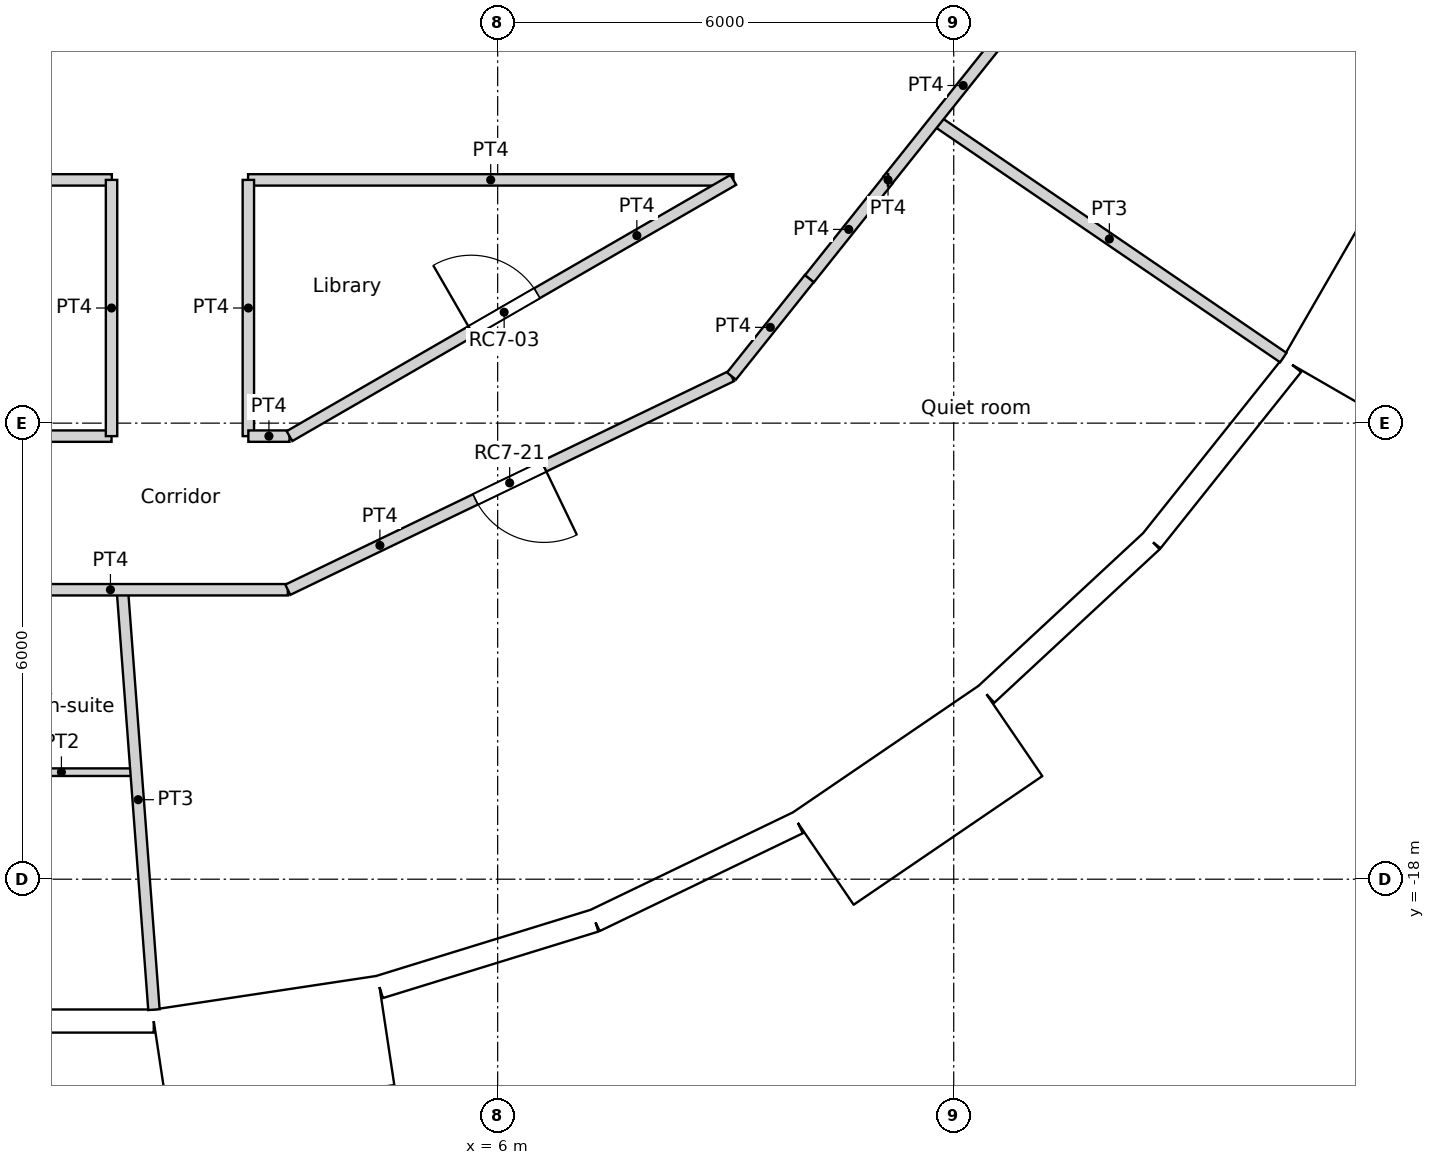
"""IFC4 building model, lengths in metres.
Left out: names, types, materials, properties, quantities, classifications, styles, units other than length and angle.
Written with IfcOpenShell. Run it as: python <this file> out.ifc"""

import sys

from ifc_helpers import new_model, si_unit, direction, frame, frame_2d, origin, origin_2d, place, context, subcontext, project, spatial, rectangle, circle, extrude, element, fill, save


model = new_model("IFC4")
c1 = context("Model", 3, precision=1e-05, world=origin(), true_north=direction((0.0, 1.0)))
c2 = subcontext(c1, "Body", "Model", "MODEL_VIEW")
j1 = project(units=[si_unit("LENGTHUNIT", "METRE"), si_unit("PLANEANGLEUNIT", "RADIAN")], contexts=[c1])
p1 = place(None, origin())
s1 = spatial("IfcSite", under=j1, at=p1, CompositionType="ELEMENT")
p2 = place(p1, origin())
s2 = spatial("IfcBuilding", under=s1, at=p2, CompositionType="ELEMENT")
p3 = place(p2, frame((0.0, 0.0, 294.6)))
s3 = spatial("IfcBuildingStorey", under=s2, at=p3, CompositionType="ELEMENT", Elevation=294.6)
for number, where, z_axis, x_axis in (
    (1, (1.406, -18.77, 0.0), (0.0, 0.0, 1.0), (1.0, 0.0, 0.0)),
    (2, (6.876, -17.521, 0.0), (0.0, 0.0, 1.0), (1.0, 0.0, 0.0)),
    (3, (11.735, -14.716, 0.0), (0.0, 0.0, 1.0), (1.0, 0.0, 0.0)),
    (4, (15.552, -10.603, 0.0), (0.0, 0.0, 1.0), (1.0, 0.0, 0.0)),
):
    element("IfcColumn", number, at=place(p3, frame(where, z_axis=z_axis, x_axis=x_axis)), inside=s3, PredefinedType="COLUMN", context=c2, shape_type="SweptSolid", body=[
        extrude(circle(Radius=0.45, at=origin_2d()), origin(), (0.0, 0.0, 1.0), 3.6),
    ])
p4 = place(p3, frame((-1.489, -19.866, 0.0), z_axis=(0.0, 0.0, 1.0), x_axis=(1.0, 0.0, 0.0)))
e5 = element("IfcWall", 5, at=p4, inside=s3, PredefinedType="SOLIDWALL", context=c2, shape_type="SweptSolid", body=[
    extrude(rectangle(XDim=2.962, YDim=0.3, at=frame_2d((1.481, 0.0))), origin(), (0.0, 0.0, 1.0), 3.25),
])
p5 = place(p4, frame((1.481, 0.0, 1.55)))
e6 = element("IfcOpeningElement", 6, at=p5, cuts=e5, PredefinedType="OPENING", context=c2, shape_type="SweptSolid", body=[
    extrude(circle(Radius=0.9, at=origin_2d()), frame((0.0, 0.16, 0.0), z_axis=(0.0, -1.0, 0.0), x_axis=(1.0, 0.0, 0.0)), (0.0, 0.0, 1.0), 0.32),
])
p6 = place(p3, frame((1.563, -20.436, -0.35), z_axis=(0.0, 0.0, 1.0), x_axis=(0.988836445254, 0.149004981587, 0.0)))
e7 = element("IfcWall", 7, at=p6, inside=s3, PredefinedType="ELEMENTEDWALL", context=c2, shape_type="SweptSolid", body=[
    extrude(rectangle(XDim=3.0, YDim=1.45, at=frame_2d((1.5, 0.0))), origin(), (0.0, 0.0, 1.0), 3.6),
])
p7 = place(p6, frame((1.5, 0.0, 1.9)))
e8 = element("IfcOpeningElement", 8, at=p7, cuts=e7, PredefinedType="OPENING", context=c2, shape_type="SweptSolid", body=[
    extrude(circle(Radius=0.9, at=origin_2d()), frame((0.0, 0.735, 0.0), z_axis=(0.0, -1.0, 0.0), x_axis=(1.0, 0.0, 0.0)), (0.0, 0.0, 1.0), 1.47),
])
p8 = place(p3, frame((4.448, -19.418, 0.0), z_axis=(0.0, 0.0, 1.0), x_axis=(0.95558635705, 0.294711238707, 0.0)))
e9 = element("IfcWall", 9, at=p8, inside=s3, PredefinedType="SOLIDWALL", context=c2, shape_type="SweptSolid", body=[
    extrude(rectangle(XDim=2.962, YDim=0.3, at=frame_2d((1.481, 0.0))), origin(), (0.0, 0.0, 1.0), 3.25),
])
p9 = place(p8, frame((1.481, 0.0, 1.55)))
e10 = element("IfcOpeningElement", 10, at=p9, cuts=e9, PredefinedType="OPENING", context=c2, shape_type="SweptSolid", body=[
    extrude(circle(Radius=0.9, at=origin_2d()), frame((0.0, 0.16, 0.0), z_axis=(0.0, -1.0, 0.0), x_axis=(1.0, 0.0, 0.0)), (0.0, 0.0, 1.0), 0.32),
])
p10 = place(p3, frame((7.278, -18.545, 0.0), z_axis=(0.0, 0.0, 1.0), x_axis=(0.900939615635, 0.433944476838, 0.0)))
e11 = element("IfcWall", 11, at=p10, inside=s3, PredefinedType="SOLIDWALL", context=c2, shape_type="SweptSolid", body=[
    extrude(rectangle(XDim=2.962, YDim=0.3, at=frame_2d((1.481, 0.0))), origin(), (0.0, 0.0, 1.0), 3.25),
])
p11 = place(p10, frame((1.481, 0.0, 1.55)))
e12 = element("IfcOpeningElement", 12, at=p11, cuts=e11, PredefinedType="OPENING", context=c2, shape_type="SweptSolid", body=[
    extrude(circle(Radius=0.9, at=origin_2d()), frame((0.0, 0.16, 0.0), z_axis=(0.0, -1.0, 0.0), x_axis=(1.0, 0.0, 0.0)), (0.0, 0.0, 1.0), 0.32),
])
p12 = place(p3, frame((10.275, -17.734, -0.35), z_axis=(0.0, 0.0, 1.0), x_axis=(0.826246281157, 0.563309047392, 0.0)))
e13 = element("IfcWall", 13, at=p12, inside=s3, PredefinedType="ELEMENTEDWALL", context=c2, shape_type="SweptSolid", body=[
    extrude(rectangle(XDim=3.0, YDim=1.45, at=frame_2d((1.5, 0.0))), origin(), (0.0, 0.0, 1.0), 3.6),
])
p13 = place(p12, frame((1.5, 0.0, 1.9)))
e14 = element("IfcOpeningElement", 14, at=p13, cuts=e13, PredefinedType="OPENING", context=c2, shape_type="SweptSolid", body=[
    extrude(circle(Radius=0.9, at=origin_2d()), frame((0.0, 0.735, 0.0), z_axis=(0.0, -1.0, 0.0), x_axis=(1.0, 0.0, 0.0)), (0.0, 0.0, 1.0), 1.47),
])
p14 = place(p3, frame((12.432, -15.565, 0.0), z_axis=(0.0, 0.0, 1.0), x_axis=(0.733066412643, 0.680157066165, 0.0)))
e15 = element("IfcWall", 15, at=p14, inside=s3, PredefinedType="SOLIDWALL", context=c2, shape_type="SweptSolid", body=[
    extrude(rectangle(XDim=2.962, YDim=0.3, at=frame_2d((1.481, 0.0))), origin(), (0.0, 0.0, 1.0), 3.25),
])
p15 = place(p14, frame((1.481, 0.0, 1.55)))
e16 = element("IfcOpeningElement", 16, at=p15, cuts=e15, PredefinedType="OPENING", context=c2, shape_type="SweptSolid", body=[
    extrude(circle(Radius=0.9, at=origin_2d()), frame((0.0, 0.16, 0.0), z_axis=(0.0, -1.0, 0.0), x_axis=(1.0, 0.0, 0.0)), (0.0, 0.0, 1.0), 0.32),
])
p16 = place(p3, frame((14.604, -13.55, 0.0), z_axis=(0.0, 0.0, 1.0), x_axis=(0.623498236992, 0.781824755599, 0.0)))
e17 = element("IfcWall", 17, at=p16, inside=s3, PredefinedType="SOLIDWALL", context=c2, shape_type="SweptSolid", body=[
    extrude(rectangle(XDim=2.962, YDim=0.3, at=frame_2d((1.481, 0.0))), origin(), (0.0, 0.0, 1.0), 3.25),
])
p17 = place(p16, frame((1.481, 0.0, 1.55)))
e18 = element("IfcOpeningElement", 18, at=p17, cuts=e17, PredefinedType="OPENING", context=c2, shape_type="SweptSolid", body=[
    extrude(circle(Radius=0.9, at=origin_2d()), frame((0.0, 0.16, 0.0), z_axis=(0.0, -1.0, 0.0), x_axis=(1.0, 0.0, 0.0)), (0.0, 0.0, 1.0), 0.32),
])
p18 = place(p3, frame((16.952, -11.52, -0.35), z_axis=(0.0, 0.0, 1.0), x_axis=(0.499990139034, 0.866031096941, 0.0)))
e19 = element("IfcWall", 19, at=p18, inside=s3, PredefinedType="ELEMENTEDWALL", context=c2, shape_type="SweptSolid", body=[
    extrude(rectangle(XDim=3.0, YDim=1.45, at=frame_2d((1.5, 0.0))), origin(), (0.0, 0.0, 1.0), 3.6),
])
p19 = place(p18, frame((1.5, 0.0, 1.9)))
e20 = element("IfcOpeningElement", 20, at=p19, cuts=e19, PredefinedType="OPENING", context=c2, shape_type="SweptSolid", body=[
    extrude(circle(Radius=0.9, at=origin_2d()), frame((0.0, 0.735, 0.0), z_axis=(0.0, -1.0, 0.0), x_axis=(1.0, 0.0, 0.0)), (0.0, 0.0, 1.0), 1.47),
])
p20 = place(p3, frame((-9.092, -8.8, 0.0), z_axis=(0.0, 0.0, 1.0), x_axis=(1.0, 0.0, 0.0)))
e21 = element("IfcWall", 21, at=p20, inside=s3, PredefinedType="PARTITIONING", context=c2, shape_type="SweptSolid", body=[
    extrude(rectangle(XDim=10.016, YDim=0.15, at=frame_2d((5.008, 0.0))), origin(), (0.0, 0.0, 1.0), 3.25),
])
p21 = place(p20, frame((4.508, 0.0, 0.0)))
e22 = element("IfcOpeningElement", 22, at=p21, cuts=e21, PredefinedType="OPENING", context=c2, shape_type="SweptSolid", body=[
    extrude(rectangle(XDim=1.0, YDim=2.04, at=frame_2d((0.5, 1.02))), frame((0.0, 0.075, 0.0), z_axis=(0.0, -1.0, 0.0), x_axis=(1.0, 0.0, 0.0)), (0.0, 0.0, 1.0), 0.15),
])
p22 = place(p3, frame((2.716, -8.8, 0.0), z_axis=(0.0, 0.0, 1.0), x_axis=(1.0, 0.0, 0.0)))
e23 = element("IfcWall", 23, at=p22, inside=s3, PredefinedType="PARTITIONING", context=c2, shape_type="SweptSolid", body=[
    extrude(rectangle(XDim=6.385, YDim=0.15, at=frame_2d((3.192, 0.0))), origin(), (0.0, 0.0, 1.0), 3.25),
])
p23 = place(p3, frame((11.137, -8.8, 0.0), z_axis=(0.0, 0.0, 1.0), x_axis=(-1.0, 0.0, 0.0)))
e24 = element("IfcWall", 24, at=p23, inside=s3, PredefinedType="PARTITIONING", context=c2, shape_type="SweptSolid", body=[
    extrude(rectangle(XDim=0.003, YDim=0.15, at=frame_2d((0.001, 0.0))), origin(), (0.0, 0.0, 1.0), 3.25),
])
p24 = place(p3, frame((10.101, -10.101, 0.0), z_axis=(0.0, 0.0, 1.0), x_axis=(0.623098344652, 0.782143498913, 0.0)))
e25 = element("IfcWall", 25, at=p24, inside=s3, PredefinedType="PARTITIONING", context=c2, shape_type="SweptSolid", body=[
    extrude(rectangle(XDim=1.661, YDim=0.15, at=frame_2d((0.831, 0.0))), origin(), (0.0, 0.0, 1.0), 3.25),
])
p25 = place(p3, frame((11.134, -8.8, 0.0), z_axis=(0.0, 0.0, 1.0), x_axis=(0.623560523309, 0.781775078761, 0.0)))
e26 = element("IfcWall", 26, at=p25, inside=s3, PredefinedType="PARTITIONING", context=c2, shape_type="SweptSolid", body=[
    extrude(rectangle(XDim=3.177, YDim=0.15, at=frame_2d((1.589, 0.0))), origin(), (0.0, 0.0, 1.0), 3.25),
])
p26 = place(p3, frame((-3.261, -12.171, 0.0), z_axis=(0.0, 0.0, 1.0), x_axis=(1.0, 0.0, 0.0)))
e27 = element("IfcWall", 27, at=p26, inside=s3, PredefinedType="PARTITIONING", context=c2, shape_type="SweptSolid", body=[
    extrude(rectangle(XDim=4.181, YDim=0.15, at=frame_2d((2.09, 0.0))), origin(), (0.0, 0.0, 1.0), 3.25),
])
for number, where, z_axis, x_axis in (
    (28, (0.92, -12.171, 0.0), (0.0, 0.0, 1.0), (0.0, 1.0, 0.0)),
    (29, (2.72, -12.171, 0.0), (0.0, 0.0, 1.0), (0.0, 1.0, 0.0)),
):
    element("IfcWall", number, at=place(p3, frame(where, z_axis=z_axis, x_axis=x_axis)), inside=s3, PredefinedType="PARTITIONING", context=c2, shape_type="SweptSolid", body=[
        extrude(rectangle(XDim=3.371, YDim=0.15, at=frame_2d((1.686, 0.0))), origin(), (0.0, 0.0, 1.0), 3.25),
    ])
p27 = place(p3, frame((2.72, -12.171, 0.0), z_axis=(0.0, 0.0, 1.0), x_axis=(1.0, 0.0, 0.0)))
e30 = element("IfcWall", 30, at=p27, inside=s3, PredefinedType="PARTITIONING", context=c2, shape_type="SweptSolid", body=[
    extrude(rectangle(XDim=0.541, YDim=0.15, at=frame_2d((0.271, 0.0))), origin(), (0.0, 0.0, 1.0), 3.25),
])
p28 = place(p3, frame((3.261, -12.171, 0.0), z_axis=(0.0, 0.0, 1.0), x_axis=(0.866066809554, 0.499928276245, 0.0)))
e31 = element("IfcWall", 31, at=p28, inside=s3, PredefinedType="PARTITIONING", context=c2, shape_type="SweptSolid", body=[
    extrude(rectangle(XDim=6.743, YDim=0.15, at=frame_2d((3.371, 0.0))), origin(), (0.0, 0.0, 1.0), 3.25),
])
p29 = place(p28, frame((2.761, 0.0, 0.0)))
e32 = element("IfcOpeningElement", 32, at=p29, cuts=e31, PredefinedType="OPENING", context=c2, shape_type="SweptSolid", body=[
    extrude(rectangle(XDim=1.0, YDim=2.04, at=frame_2d((0.5, 1.02))), frame((0.0, 0.075, 0.0), z_axis=(0.0, -1.0, 0.0), x_axis=(1.0, 0.0, 0.0)), (0.0, 0.0, 1.0), 0.15),
])
p30 = place(p3, frame((-3.239, -14.192, 0.0), z_axis=(0.0, 0.0, 1.0), x_axis=(1.0, 0.0, 0.0)))
e33 = element("IfcWall", 33, at=p30, inside=s3, PredefinedType="PARTITIONING", context=c2, shape_type="SweptSolid", body=[
    extrude(rectangle(XDim=6.478, YDim=0.15, at=frame_2d((3.239, 0.0))), origin(), (0.0, 0.0, 1.0), 3.25),
])
p31 = place(p30, frame((0.761, 0.0, 0.0)))
e34 = element("IfcOpeningElement", 34, at=p31, cuts=e33, PredefinedType="OPENING", context=c2, shape_type="SweptSolid", body=[
    extrude(rectangle(XDim=1.0, YDim=2.1, at=frame_2d((0.5, 1.05))), frame((0.0, 0.075, 0.0), z_axis=(0.0, -1.0, 0.0), x_axis=(1.0, 0.0, 0.0)), (0.0, 0.0, 1.0), 0.15),
])
p32 = place(p3, frame((9.076, -11.381, 0.0), z_axis=(0.0, 0.0, 1.0), x_axis=(0.623805208652, 0.781579849829, 0.0)))
e35 = element("IfcWall", 35, at=p32, inside=s3, PredefinedType="PARTITIONING", context=c2, shape_type="SweptSolid", body=[
    extrude(rectangle(XDim=1.64, YDim=0.15, at=frame_2d((0.82, 0.0))), origin(), (0.0, 0.0, 1.0), 3.25),
])
p33 = place(p3, frame((3.239, -14.192, 0.0), z_axis=(0.0, 0.0, 1.0), x_axis=(0.900976027191, 0.433868872388, 0.0)))
e36 = element("IfcWall", 36, at=p33, inside=s3, PredefinedType="PARTITIONING", context=c2, shape_type="SweptSolid", body=[
    extrude(rectangle(XDim=6.479, YDim=0.15, at=frame_2d((3.239, 0.0))), origin(), (0.0, 0.0, 1.0), 3.25),
])
p34 = place(p33, frame((2.74, 0.0, 0.0)))
e37 = element("IfcOpeningElement", 37, at=p34, cuts=e36, PredefinedType="OPENING", context=c2, shape_type="SweptSolid", body=[
    extrude(rectangle(XDim=1.0, YDim=2.04, at=frame_2d((0.5, 1.02))), frame((0.0, 0.075, 0.0), z_axis=(0.0, -1.0, 0.0), x_axis=(1.0, 0.0, 0.0)), (0.0, 0.0, 1.0), 0.15),
])
p35 = place(p3, frame((-0.722, -16.592, 0.0), z_axis=(0.0, 0.0, 1.0), x_axis=(1.0, 0.0, 0.0)))
e38 = element("IfcWall", 38, at=p35, inside=s3, PredefinedType="PARTITIONING", context=c2, shape_type="SweptSolid", body=[
    extrude(rectangle(XDim=1.965, YDim=0.1, at=frame_2d((0.982, 0.0))), origin(), (0.0, 0.0, 1.0), 3.25),
])
for number, where, z_axis, x_axis in (
    (39, (1.062, -14.192, 0.0), (0.0, 0.0, 1.0), (0.075, -0.997, 0.0)),
    (40, (11.759, -8.017, 0.0), (0.0, 0.0, 1.0), (0.826, -0.563, 0.0)),
):
    element("IfcWall", number, at=place(p3, frame(where, z_axis=z_axis, x_axis=x_axis)), inside=s3, PredefinedType="PARTITIONING", context=c2, shape_type="SweptSolid", body=[
        extrude(rectangle(XDim=5.54, YDim=0.15, at=frame_2d((2.77, 0.0))), origin(), (0.0, 0.0, 1.0), 3.25),
    ])
p36 = place(p5, origin())
e41 = element("IfcWindow", 41, at=p36, inside=s3, PartitioningType="SINGLE_PANEL", PredefinedType="WINDOW", context=c2, shape_type="SweptSolid", body=[
    extrude(circle(Radius=0.9, at=origin_2d()), frame((0.0, 0.12, 0.0), z_axis=(0.0, -1.0, 0.0), x_axis=(1.0, 0.0, 0.0)), (0.0, 0.0, 1.0), 0.1),
])
fill(e6, e41)
p37 = place(p7, origin())
e42 = element("IfcWindow", 42, at=p37, inside=s3, PartitioningType="SINGLE_PANEL", PredefinedType="WINDOW", context=c2, shape_type="SweptSolid", body=[
    extrude(circle(Radius=0.9, at=origin_2d()), frame((0.0, 0.695, 0.0), z_axis=(0.0, -1.0, 0.0), x_axis=(1.0, 0.0, 0.0)), (0.0, 0.0, 1.0), 0.1),
])
fill(e8, e42)
p38 = place(p9, origin())
e43 = element("IfcWindow", 43, at=p38, inside=s3, PartitioningType="SINGLE_PANEL", PredefinedType="WINDOW", context=c2, shape_type="SweptSolid", body=[
    extrude(circle(Radius=0.9, at=origin_2d()), frame((0.0, 0.12, 0.0), z_axis=(0.0, -1.0, 0.0), x_axis=(1.0, 0.0, 0.0)), (0.0, 0.0, 1.0), 0.1),
])
fill(e10, e43)
p39 = place(p11, origin())
e44 = element("IfcWindow", 44, at=p39, inside=s3, PartitioningType="SINGLE_PANEL", PredefinedType="WINDOW", context=c2, shape_type="SweptSolid", body=[
    extrude(circle(Radius=0.9, at=origin_2d()), frame((0.0, 0.12, 0.0), z_axis=(0.0, -1.0, 0.0), x_axis=(1.0, 0.0, 0.0)), (0.0, 0.0, 1.0), 0.1),
])
fill(e12, e44)
p40 = place(p13, origin())
e45 = element("IfcWindow", 45, at=p40, inside=s3, PartitioningType="SINGLE_PANEL", PredefinedType="WINDOW", context=c2, shape_type="SweptSolid", body=[
    extrude(circle(Radius=0.9, at=origin_2d()), frame((0.0, 0.695, 0.0), z_axis=(0.0, -1.0, 0.0), x_axis=(1.0, 0.0, 0.0)), (0.0, 0.0, 1.0), 0.1),
])
fill(e14, e45)
p41 = place(p15, origin())
e46 = element("IfcWindow", 46, at=p41, inside=s3, PartitioningType="SINGLE_PANEL", PredefinedType="WINDOW", context=c2, shape_type="SweptSolid", body=[
    extrude(circle(Radius=0.9, at=origin_2d()), frame((0.0, 0.12, 0.0), z_axis=(0.0, -1.0, 0.0), x_axis=(1.0, 0.0, 0.0)), (0.0, 0.0, 1.0), 0.1),
])
fill(e16, e46)
p42 = place(p17, origin())
e47 = element("IfcWindow", 47, at=p42, inside=s3, PartitioningType="SINGLE_PANEL", PredefinedType="WINDOW", context=c2, shape_type="SweptSolid", body=[
    extrude(circle(Radius=0.9, at=origin_2d()), frame((0.0, 0.12, 0.0), z_axis=(0.0, -1.0, 0.0), x_axis=(1.0, 0.0, 0.0)), (0.0, 0.0, 1.0), 0.1),
])
fill(e18, e47)
p43 = place(p19, origin())
e48 = element("IfcWindow", 48, at=p43, inside=s3, PartitioningType="SINGLE_PANEL", PredefinedType="WINDOW", context=c2, shape_type="SweptSolid", body=[
    extrude(circle(Radius=0.9, at=origin_2d()), frame((0.0, 0.695, 0.0), z_axis=(0.0, -1.0, 0.0), x_axis=(1.0, 0.0, 0.0)), (0.0, 0.0, 1.0), 0.1),
])
fill(e20, e48)
p44 = place(p29, origin())
e49 = element("IfcDoor", 49, at=p44, inside=s3, OperationType="SINGLE_SWING_LEFT", PredefinedType="DOOR", context=c2, shape_type="SweptSolid", body=[
    extrude(rectangle(XDim=1.0, YDim=2.04, at=frame_2d((0.5, 1.02))), frame((0.0, 0.025, 0.0), z_axis=(0.0, -1.0, 0.0), x_axis=(1.0, 0.0, 0.0)), (0.0, 0.0, 1.0), 0.05),
])
fill(e32, e49)
p45 = place(p34, origin())
e50 = element("IfcDoor", 50, at=p45, inside=s3, OperationType="SINGLE_SWING_LEFT", PredefinedType="DOOR", context=c2, shape_type="SweptSolid", body=[
    extrude(rectangle(XDim=1.0, YDim=2.04, at=frame_2d((0.5, 1.02))), frame((0.0, 0.025, 0.0), z_axis=(0.0, -1.0, 0.0), x_axis=(1.0, 0.0, 0.0)), (0.0, 0.0, 1.0), 0.05),
])
fill(e37, e50)
save(model, sys.argv[1])
